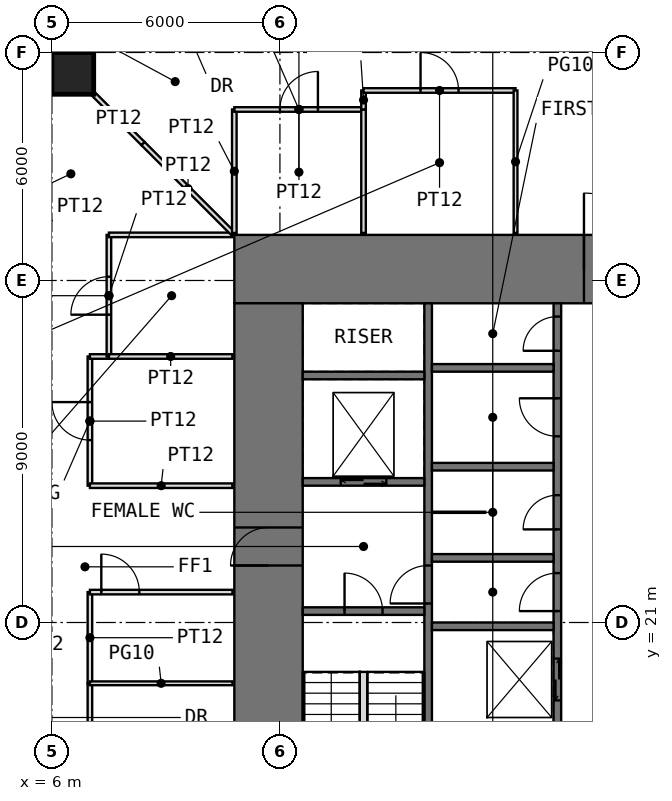
"""IFC4 building model, lengths in metres.
Left out: names, types, materials, properties, quantities, classifications, styles, units other than length and angle.
Written with IfcOpenShell. Run it as: python <this file> out.ifc"""

import sys

from ifc_helpers import new_model, si_unit, direction, frame, frame_2d, origin, origin_2d, place, context, subcontext, project, spatial, rectangle, extrude, element, fill, save


model = new_model("IFC4")
c1 = context("Model", 3, precision=1e-05, world=origin(), true_north=direction((0.0, 1.0)))
c2 = subcontext(c1, "Body", "Model", "MODEL_VIEW")
j1 = project(units=[si_unit("LENGTHUNIT", "METRE"), si_unit("PLANEANGLEUNIT", "RADIAN")], contexts=[c1])
p1 = place(None, origin())
s1 = spatial("IfcSite", under=j1, at=p1, CompositionType="ELEMENT")
p2 = place(p1, origin())
s2 = spatial("IfcBuilding", under=s1, at=p2, CompositionType="ELEMENT")
p3 = place(p2, frame((0.0, 0.0, 30.5)))
s3 = spatial("IfcBuildingStorey", under=s2, at=p3, CompositionType="ELEMENT", Elevation=30.5)
p4 = place(p3, frame((6.55, 35.45, 0.0), z_axis=(0.0, 0.0, 1.0), x_axis=(1.0, 0.0, 0.0)))
e1 = element("IfcColumn", 1, at=p4, inside=s3, PredefinedType="COLUMN", context=c2, shape_type="SweptSolid", body=[
    extrude(rectangle(XDim=1.1, YDim=1.1, at=origin_2d()), origin(), (0.0, 0.0, 1.0), 4.0),
])
p5 = place(p3, frame((10.8, 30.3, -0.05), z_axis=(0.0, 0.0, 1.0), x_axis=(1.0, 0.0, 0.0)))
e2 = element("IfcWall", 2, at=p5, inside=s3, PredefinedType="SHEAR", context=c2, shape_type="SweptSolid", body=[
    extrude(rectangle(XDim=20.4, YDim=1.8, at=frame_2d((10.2, 0.0))), origin(), (0.0, 0.0, 1.0), 4.0),
])
p6 = place(p5, frame((9.2, 0.0, 0.05)))
e3 = element("IfcOpeningElement", 3, at=p6, cuts=e2, PredefinedType="OPENING", context=c2, shape_type="SweptSolid", body=[
    extrude(rectangle(XDim=2.0, YDim=2.2, at=frame_2d((1.0, 1.1))), frame((0.0, 0.91, 0.0), z_axis=(0.0, -1.0, 0.0), x_axis=(1.0, 0.0, 0.0)), (0.0, 0.0, 1.0), 1.82),
])
p7 = place(p3, frame((11.7, 12.6, -0.05), z_axis=(0.0, 0.0, 1.0), x_axis=(0.0, 1.0, 0.0)))
e4 = element("IfcWall", 4, at=p7, inside=s3, PredefinedType="SHEAR", context=c2, shape_type="SweptSolid", body=[
    extrude(rectangle(XDim=16.8, YDim=1.8, at=frame_2d((8.4, 0.0))), origin(), (0.0, 0.0, 1.0), 4.0),
])
p8 = place(p7, frame((9.9, 0.0, 0.05)))
e5 = element("IfcOpeningElement", 5, at=p8, cuts=e4, PredefinedType="OPENING", context=c2, shape_type="SweptSolid", body=[
    extrude(rectangle(XDim=1.0, YDim=2.2, at=frame_2d((0.5, 1.1))), frame((0.0, 0.91, 0.0), z_axis=(0.0, -1.0, 0.0), x_axis=(1.0, 0.0, 0.0)), (0.0, 0.0, 1.0), 1.82),
])
p9 = place(p3, frame((15.9, 12.6, -0.05), z_axis=(0.0, 0.0, 1.0), x_axis=(0.0, 1.0, 0.0)))
e6 = element("IfcWall", 6, at=p9, inside=s3, PredefinedType="SHEAR", context=c2, shape_type="SweptSolid", body=[
    extrude(rectangle(XDim=16.8, YDim=0.2, at=frame_2d((8.4, 0.0))), origin(), (0.0, 0.0, 1.0), 4.0),
])
p10 = place(p9, frame((8.9, 0.0, 0.05)))
e7 = element("IfcOpeningElement", 7, at=p10, cuts=e6, PredefinedType="OPENING", context=c2, shape_type="SweptSolid", body=[
    extrude(rectangle(XDim=1.0, YDim=2.2, at=frame_2d((0.5, 1.1))), frame((0.0, 0.11, 0.0), z_axis=(0.0, -1.0, 0.0), x_axis=(1.0, 0.0, 0.0)), (0.0, 0.0, 1.0), 0.22),
])
p11 = place(p3, frame((19.3, 12.6, -0.05), z_axis=(0.0, 0.0, 1.0), x_axis=(0.0, 1.0, 0.0)))
e8 = element("IfcWall", 8, at=p11, inside=s3, PredefinedType="SHEAR", context=c2, shape_type="SweptSolid", body=[
    extrude(rectangle(XDim=16.8, YDim=0.2, at=frame_2d((8.4, 0.0))), origin(), (0.0, 0.0, 1.0), 4.0),
])
p12 = place(p11, frame((8.7, 0.0, 0.05)))
e9 = element("IfcOpeningElement", 9, at=p12, cuts=e8, PredefinedType="OPENING", context=c2, shape_type="SweptSolid", body=[
    extrude(rectangle(XDim=1.0, YDim=2.2, at=frame_2d((0.5, 1.1))), frame((0.0, 0.11, 0.0), z_axis=(0.0, -1.0, 0.0), x_axis=(1.0, 0.0, 0.0)), (0.0, 0.0, 1.0), 0.22),
])
p13 = place(p11, frame((10.85, 0.0, 0.05)))
e10 = element("IfcOpeningElement", 10, at=p13, cuts=e8, PredefinedType="OPENING", context=c2, shape_type="SweptSolid", body=[
    extrude(rectangle(XDim=0.9, YDim=2.2, at=frame_2d((0.45, 1.1))), frame((0.0, 0.11, 0.0), z_axis=(0.0, -1.0, 0.0), x_axis=(1.0, 0.0, 0.0)), (0.0, 0.0, 1.0), 0.22),
])
p14 = place(p11, frame((13.3, 0.0, 0.05)))
e11 = element("IfcOpeningElement", 11, at=p14, cuts=e8, PredefinedType="OPENING", context=c2, shape_type="SweptSolid", body=[
    extrude(rectangle(XDim=1.0, YDim=2.2, at=frame_2d((0.5, 1.1))), frame((0.0, 0.11, 0.0), z_axis=(0.0, -1.0, 0.0), x_axis=(1.0, 0.0, 0.0)), (0.0, 0.0, 1.0), 0.22),
])
p15 = place(p11, frame((15.55, 0.0, 0.05)))
e12 = element("IfcOpeningElement", 12, at=p15, cuts=e8, PredefinedType="OPENING", context=c2, shape_type="SweptSolid", body=[
    extrude(rectangle(XDim=0.9, YDim=2.2, at=frame_2d((0.45, 1.1))), frame((0.0, 0.11, 0.0), z_axis=(0.0, -1.0, 0.0), x_axis=(1.0, 0.0, 0.0)), (0.0, 0.0, 1.0), 0.22),
])
p16 = place(p11, frame((0.75, 0.0, 0.05)))
e13 = element("IfcOpeningElement", 13, at=p16, cuts=e8, PredefinedType="OPENING", context=c2, shape_type="SweptSolid", body=[
    extrude(rectangle(XDim=1.1, YDim=2.2, at=frame_2d((0.55, 1.1))), frame((0.0, 0.11, 0.0), z_axis=(0.0, -1.0, 0.0), x_axis=(1.0, 0.0, 0.0)), (0.0, 0.0, 1.0), 0.22),
])
p17 = place(p11, frame((3.55, 0.0, 0.05)))
e14 = element("IfcOpeningElement", 14, at=p17, cuts=e8, PredefinedType="OPENING", context=c2, shape_type="SweptSolid", body=[
    extrude(rectangle(XDim=1.1, YDim=2.2, at=frame_2d((0.55, 1.1))), frame((0.0, 0.11, 0.0), z_axis=(0.0, -1.0, 0.0), x_axis=(1.0, 0.0, 0.0)), (0.0, 0.0, 1.0), 0.22),
])
p18 = place(p11, frame((6.35, 0.0, 0.05)))
e15 = element("IfcOpeningElement", 15, at=p18, cuts=e8, PredefinedType="OPENING", context=c2, shape_type="SweptSolid", body=[
    extrude(rectangle(XDim=1.1, YDim=2.2, at=frame_2d((0.55, 1.1))), frame((0.0, 0.11, 0.0), z_axis=(0.0, -1.0, 0.0), x_axis=(1.0, 0.0, 0.0)), (0.0, 0.0, 1.0), 0.22),
])
p19 = place(p3, frame((12.6, 21.3, -0.05), z_axis=(0.0, 0.0, 1.0), x_axis=(1.0, 0.0, 0.0)))
e16 = element("IfcWall", 16, at=p19, inside=s3, PredefinedType="SHEAR", context=c2, shape_type="SweptSolid", body=[
    extrude(rectangle(XDim=3.2, YDim=0.2, at=frame_2d((1.6, 0.0))), origin(), (0.0, 0.0, 1.0), 4.0),
])
p20 = place(p19, frame((1.1, 0.0, 0.05)))
e17 = element("IfcOpeningElement", 17, at=p20, cuts=e16, PredefinedType="OPENING", context=c2, shape_type="SweptSolid", body=[
    extrude(rectangle(XDim=1.0, YDim=2.2, at=frame_2d((0.5, 1.1))), frame((0.0, 0.11, 0.0), z_axis=(0.0, -1.0, 0.0), x_axis=(1.0, 0.0, 0.0)), (0.0, 0.0, 1.0), 0.22),
])
p21 = place(p3, frame((12.6, 24.7, -0.05), z_axis=(0.0, 0.0, 1.0), x_axis=(1.0, 0.0, 0.0)))
e18 = element("IfcWall", 18, at=p21, inside=s3, PredefinedType="SHEAR", context=c2, shape_type="SweptSolid", body=[
    extrude(rectangle(XDim=3.2, YDim=0.2, at=frame_2d((1.6, 0.0))), origin(), (0.0, 0.0, 1.0), 4.0),
])
p22 = place(p21, frame((1.0, 0.0, 0.05)))
e19 = element("IfcOpeningElement", 19, at=p22, cuts=e18, PredefinedType="OPENING", context=c2, shape_type="SweptSolid", body=[
    extrude(rectangle(XDim=1.2, YDim=2.2, at=frame_2d((0.6, 1.1))), frame((0.0, 0.11, 0.0), z_axis=(0.0, -1.0, 0.0), x_axis=(1.0, 0.0, 0.0)), (0.0, 0.0, 1.0), 0.22),
])
for number, where, z_axis, x_axis in (
    (20, (12.6, 27.5, -0.05), (0.0, 0.0, 1.0), (1.0, 0.0, 0.0)),
    (21, (16.0, 20.9, -0.05), (0.0, 0.0, 1.0), (1.0, 0.0, 0.0)),
    (22, (16.0, 22.7, -0.05), (0.0, 0.0, 1.0), (1.0, 0.0, 0.0)),
    (23, (16.0, 25.1, -0.05), (0.0, 0.0, 1.0), (1.0, 0.0, 0.0)),
    (24, (16.0, 27.7, -0.05), (0.0, 0.0, 1.0), (1.0, 0.0, 0.0)),
):
    element("IfcWall", number, at=place(p3, frame(where, z_axis=z_axis, x_axis=x_axis)), inside=s3, PredefinedType="SHEAR", context=c2, shape_type="SweptSolid", body=[
        extrude(rectangle(XDim=3.2, YDim=0.2, at=frame_2d((1.6, 0.0))), origin(), (0.0, 0.0, 1.0), 4.0),
    ])
p23 = place(p3, frame((16.0, 23.9, 0.0), z_axis=(0.0, 0.0, 1.0), x_axis=(1.0, 0.0, 0.0)))
e25 = element("IfcWall", 25, at=p23, inside=s3, PredefinedType="PARTITIONING", context=c2, shape_type="SweptSolid", body=[
    extrude(rectangle(XDim=1.4, YDim=0.03, at=frame_2d((0.7, 0.0))), origin(), (0.0, 0.0, 1.0), 3.75),
])
p24 = place(p3, frame((7.0, 15.8, 0.0), z_axis=(0.0, 0.0, 1.0), x_axis=(0.0, 1.0, 0.0)))
e26 = element("IfcWall", 26, at=p24, inside=s3, PredefinedType="PARTITIONING", context=c2, shape_type="SweptSolid", body=[
    extrude(rectangle(XDim=3.6, YDim=0.12, at=frame_2d((1.8, 0.0))), origin(), (0.0, 0.0, 1.0), 3.75),
])
p25 = place(p24, frame((1.3, 0.0, 0.0)))
e27 = element("IfcOpeningElement", 27, at=p25, cuts=e26, PredefinedType="OPENING", context=c2, shape_type="SweptSolid", body=[
    extrude(rectangle(XDim=1.0, YDim=2.4, at=frame_2d((0.5, 1.2))), frame((0.0, 0.07, 0.0), z_axis=(0.0, -1.0, 0.0), x_axis=(1.0, 0.0, 0.0)), (0.0, 0.0, 1.0), 0.14),
])
p26 = place(p3, frame((7.0, 19.4, 0.0), z_axis=(0.0, 0.0, 1.0), x_axis=(0.0, 1.0, 0.0)))
e28 = element("IfcWall", 28, at=p26, inside=s3, PredefinedType="PARTITIONING", context=c2, shape_type="SweptSolid", body=[
    extrude(rectangle(XDim=2.4, YDim=0.12, at=frame_2d((1.2, 0.0))), origin(), (0.0, 0.0, 1.0), 3.75),
])
p27 = place(p3, frame((7.0, 19.4, 0.0), z_axis=(0.0, 0.0, 1.0), x_axis=(1.0, 0.0, 0.0)))
e29 = element("IfcWall", 29, at=p27, inside=s3, PredefinedType="PARTITIONING", context=c2, shape_type="SweptSolid", body=[
    extrude(rectangle(XDim=3.75, YDim=0.1, at=frame_2d((1.875, 0.0))), origin(), (0.0, 0.0, 1.0), 3.75),
])
p28 = place(p3, frame((7.0, 21.8, 0.0), z_axis=(0.0, 0.0, 1.0), x_axis=(1.0, 0.0, 0.0)))
e30 = element("IfcWall", 30, at=p28, inside=s3, PredefinedType="PARTITIONING", context=c2, shape_type="SweptSolid", body=[
    extrude(rectangle(XDim=3.75, YDim=0.12, at=frame_2d((1.875, 0.0))), origin(), (0.0, 0.0, 1.0), 3.75),
])
p29 = place(p28, frame((0.3, 0.0, 0.0)))
e31 = element("IfcOpeningElement", 31, at=p29, cuts=e30, PredefinedType="OPENING", context=c2, shape_type="SweptSolid", body=[
    extrude(rectangle(XDim=1.0, YDim=2.4, at=frame_2d((0.5, 1.2))), frame((0.0, 0.07, 0.0), z_axis=(0.0, -1.0, 0.0), x_axis=(1.0, 0.0, 0.0)), (0.0, 0.0, 1.0), 0.14),
])
p30 = place(p3, frame((7.0, 24.6, 0.0), z_axis=(0.0, 0.0, 1.0), x_axis=(0.0, 1.0, 0.0)))
e32 = element("IfcWall", 32, at=p30, inside=s3, PredefinedType="PARTITIONING", context=c2, shape_type="SweptSolid", body=[
    extrude(rectangle(XDim=3.4, YDim=0.12, at=frame_2d((1.7, 0.0))), origin(), (0.0, 0.0, 1.0), 3.75),
])
p31 = place(p30, frame((1.2, 0.0, 0.0)))
e33 = element("IfcOpeningElement", 33, at=p31, cuts=e32, PredefinedType="OPENING", context=c2, shape_type="SweptSolid", body=[
    extrude(rectangle(XDim=1.0, YDim=2.4, at=frame_2d((0.5, 1.2))), frame((0.0, 0.07, 0.0), z_axis=(0.0, -1.0, 0.0), x_axis=(1.0, 0.0, 0.0)), (0.0, 0.0, 1.0), 0.14),
])
p32 = place(p3, frame((7.0, 24.6, 0.0), z_axis=(0.0, 0.0, 1.0), x_axis=(1.0, 0.0, 0.0)))
e34 = element("IfcWall", 34, at=p32, inside=s3, PredefinedType="PARTITIONING", context=c2, shape_type="SweptSolid", body=[
    extrude(rectangle(XDim=3.75, YDim=0.12, at=frame_2d((1.875, 0.0))), origin(), (0.0, 0.0, 1.0), 3.75),
])
p33 = place(p3, frame((7.0, 28.0, 0.0), z_axis=(0.0, 0.0, 1.0), x_axis=(1.0, 0.0, 0.0)))
e35 = element("IfcWall", 35, at=p33, inside=s3, PredefinedType="PARTITIONING", context=c2, shape_type="SweptSolid", body=[
    extrude(rectangle(XDim=0.5, YDim=0.12, at=frame_2d((0.25, 0.0))), origin(), (0.0, 0.0, 1.0), 3.75),
])
p34 = place(p3, frame((7.11, 34.89, 0.0), z_axis=(0.0, 0.0, 1.0), x_axis=(0.707106781187, -0.707106781187, 0.0)))
e36 = element("IfcWall", 36, at=p34, inside=s3, PredefinedType="PARTITIONING", context=c2, shape_type="SweptSolid", body=[
    extrude(rectangle(XDim=1.822, YDim=0.12, at=frame_2d((0.911, 0.0))), origin(), (0.0, 0.0, 1.0), 3.75),
])
p35 = place(p3, frame((7.5, 28.0, 0.0), z_axis=(0.0, 0.0, 1.0), x_axis=(0.0, 1.0, 0.0)))
e37 = element("IfcWall", 37, at=p35, inside=s3, PredefinedType="PARTITIONING", context=c2, shape_type="SweptSolid", body=[
    extrude(rectangle(XDim=3.2, YDim=0.12, at=frame_2d((1.6, 0.0))), origin(), (0.0, 0.0, 1.0), 3.75),
])
p36 = place(p35, frame((1.1, 0.0, 0.0)))
e38 = element("IfcOpeningElement", 38, at=p36, cuts=e37, PredefinedType="OPENING", context=c2, shape_type="SweptSolid", body=[
    extrude(rectangle(XDim=1.0, YDim=2.2, at=frame_2d((0.5, 1.1))), frame((0.0, 0.07, 0.0), z_axis=(0.0, -1.0, 0.0), x_axis=(1.0, 0.0, 0.0)), (0.0, 0.0, 1.0), 0.14),
])
for number, where, z_axis, x_axis in (
    (39, (7.5, 28.0, 0.0), (0.0, 0.0, 1.0), (1.0, 0.0, 0.0)),
    (40, (7.5, 31.2, 0.0), (0.0, 0.0, 1.0), (1.0, 0.0, 0.0)),
):
    element("IfcWall", number, at=place(p3, frame(where, z_axis=z_axis, x_axis=x_axis)), inside=s3, PredefinedType="PARTITIONING", context=c2, shape_type="SweptSolid", body=[
        extrude(rectangle(XDim=3.25, YDim=0.12, at=frame_2d((1.625, 0.0))), origin(), (0.0, 0.0, 1.0), 3.75),
    ])
p37 = place(p3, frame((8.398, 33.602, 0.0), z_axis=(0.0, 0.0, 1.0), x_axis=(0.707106781187, -0.707106781187, 0.0)))
e41 = element("IfcWall", 41, at=p37, inside=s3, PredefinedType="PARTITIONING", context=c2, shape_type="SweptSolid", body=[
    extrude(rectangle(XDim=3.346, YDim=0.12, at=frame_2d((1.673, 0.0))), origin(), (0.0, 0.0, 1.0), 3.75),
])
p38 = place(p3, frame((10.8, 31.25, 0.0), z_axis=(0.0, 0.0, 1.0), x_axis=(0.0, 1.0, 0.0)))
e42 = element("IfcWall", 42, at=p38, inside=s3, PredefinedType="PARTITIONING", context=c2, shape_type="SweptSolid", body=[
    extrude(rectangle(XDim=3.25, YDim=0.12, at=frame_2d((1.625, 0.0))), origin(), (0.0, 0.0, 1.0), 3.75),
])
p39 = place(p3, frame((10.8, 34.5, 0.0), z_axis=(0.0, 0.0, 1.0), x_axis=(1.0, 0.0, 0.0)))
e43 = element("IfcWall", 43, at=p39, inside=s3, PredefinedType="PARTITIONING", context=c2, shape_type="SweptSolid", body=[
    extrude(rectangle(XDim=3.4, YDim=0.12, at=frame_2d((1.7, 0.0))), origin(), (0.0, 0.0, 1.0), 3.75),
])
p40 = place(p39, frame((1.2, 0.0, 0.0)))
e44 = element("IfcOpeningElement", 44, at=p40, cuts=e43, PredefinedType="OPENING", context=c2, shape_type="SweptSolid", body=[
    extrude(rectangle(XDim=1.0, YDim=2.2, at=frame_2d((0.5, 1.1))), frame((0.0, 0.07, 0.0), z_axis=(0.0, -1.0, 0.0), x_axis=(1.0, 0.0, 0.0)), (0.0, 0.0, 1.0), 0.14),
])
p41 = place(p3, frame((14.2, 31.25, 0.0), z_axis=(0.0, 0.0, 1.0), x_axis=(0.0, 1.0, 0.0)))
e45 = element("IfcWall", 45, at=p41, inside=s3, PredefinedType="PARTITIONING", context=c2, shape_type="SweptSolid", body=[
    extrude(rectangle(XDim=3.25, YDim=0.12, at=frame_2d((1.625, 0.0))), origin(), (0.0, 0.0, 1.0), 3.75),
])
p42 = place(p3, frame((14.2, 34.5, 0.0), z_axis=(0.0, 0.0, 1.0), x_axis=(0.0, 1.0, 0.0)))
e46 = element("IfcWall", 46, at=p42, inside=s3, PredefinedType="PARTITIONING", context=c2, shape_type="SweptSolid", body=[
    extrude(rectangle(XDim=0.5, YDim=0.12, at=frame_2d((0.25, 0.0))), origin(), (0.0, 0.0, 1.0), 3.75),
])
p43 = place(p3, frame((14.2, 35.0, 0.0), z_axis=(0.0, 0.0, 1.0), x_axis=(1.0, 0.0, 0.0)))
e47 = element("IfcWall", 47, at=p43, inside=s3, PredefinedType="PARTITIONING", context=c2, shape_type="SweptSolid", body=[
    extrude(rectangle(XDim=4.0, YDim=0.12, at=frame_2d((2.0, 0.0))), origin(), (0.0, 0.0, 1.0), 3.75),
])
p44 = place(p43, frame((1.5, 0.0, 0.0)))
e48 = element("IfcOpeningElement", 48, at=p44, cuts=e47, PredefinedType="OPENING", context=c2, shape_type="SweptSolid", body=[
    extrude(rectangle(XDim=1.0, YDim=2.4, at=frame_2d((0.5, 1.2))), frame((0.0, 0.07, 0.0), z_axis=(0.0, -1.0, 0.0), x_axis=(1.0, 0.0, 0.0)), (0.0, 0.0, 1.0), 0.14),
])
p45 = place(p3, frame((18.2, 31.25, 0.0), z_axis=(0.0, 0.0, 1.0), x_axis=(0.0, 1.0, 0.0)))
e49 = element("IfcWall", 49, at=p45, inside=s3, PredefinedType="PARTITIONING", context=c2, shape_type="SweptSolid", body=[
    extrude(rectangle(XDim=3.75, YDim=0.1, at=frame_2d((1.875, 0.0))), origin(), (0.0, 0.0, 1.0), 3.75),
])
p46 = place(p3, frame((14.2, 16.62, 0.0), z_axis=(0.0, 0.0, 1.0), x_axis=(0.0, 1.0, 0.0)))
e50 = element("IfcWall", 50, at=p46, inside=s3, PredefinedType="PARTITIONING", context=c2, shape_type="SweptSolid", body=[
    extrude(rectangle(XDim=3.08, YDim=0.2, at=frame_2d((1.54, 0.0))), origin(), (0.0, 0.0, 1.0), 4.0),
])
p47 = place(p6, origin())
e51 = element("IfcDoor", 51, at=p47, inside=s3, OperationType="DOUBLE_DOOR_SINGLE_SWING", PredefinedType="DOOR", context=c2, shape_type="SweptSolid", body=[
    extrude(rectangle(XDim=2.0, YDim=2.2, at=frame_2d((1.0, 1.1))), frame((0.0, 0.025, 0.0), z_axis=(0.0, -1.0, 0.0), x_axis=(1.0, 0.0, 0.0)), (0.0, 0.0, 1.0), 0.05),
])
fill(e3, e51)
p48 = place(p8, origin())
e52 = element("IfcDoor", 52, at=p48, inside=s3, OperationType="SINGLE_SWING_LEFT", PredefinedType="DOOR", context=c2, shape_type="SweptSolid", body=[
    extrude(rectangle(XDim=1.0, YDim=2.2, at=frame_2d((0.5, 1.1))), frame((0.0, 0.025, 0.0), z_axis=(0.0, -1.0, 0.0), x_axis=(1.0, 0.0, 0.0)), (0.0, 0.0, 1.0), 0.05),
])
fill(e5, e52)
p49 = place(p20, origin())
e53 = element("IfcDoor", 53, at=p49, inside=s3, OperationType="SINGLE_SWING_LEFT", PredefinedType="DOOR", context=c2, shape_type="SweptSolid", body=[
    extrude(rectangle(XDim=1.0, YDim=2.2, at=frame_2d((0.5, 1.1))), frame((0.0, 0.025, 0.0), z_axis=(0.0, -1.0, 0.0), x_axis=(1.0, 0.0, 0.0)), (0.0, 0.0, 1.0), 0.05),
])
fill(e17, e53)
p50 = place(p10, origin())
e54 = element("IfcDoor", 54, at=p50, inside=s3, OperationType="SINGLE_SWING_LEFT", PredefinedType="DOOR", context=c2, shape_type="SweptSolid", body=[
    extrude(rectangle(XDim=1.0, YDim=2.2, at=frame_2d((0.5, 1.1))), frame((0.0, 0.025, 0.0), z_axis=(0.0, -1.0, 0.0), x_axis=(1.0, 0.0, 0.0)), (0.0, 0.0, 1.0), 0.05),
])
fill(e7, e54)
p51 = place(p12, origin())
e55 = element("IfcDoor", 55, at=p51, inside=s3, OperationType="SINGLE_SWING_LEFT", PredefinedType="DOOR", context=c2, shape_type="SweptSolid", body=[
    extrude(rectangle(XDim=1.0, YDim=2.2, at=frame_2d((0.5, 1.1))), frame((0.0, 0.025, 0.0), z_axis=(0.0, -1.0, 0.0), x_axis=(1.0, 0.0, 0.0)), (0.0, 0.0, 1.0), 0.05),
])
fill(e9, e55)
p52 = place(p13, origin())
e56 = element("IfcDoor", 56, at=p52, inside=s3, OperationType="SINGLE_SWING_LEFT", PredefinedType="DOOR", context=c2, shape_type="SweptSolid", body=[
    extrude(rectangle(XDim=0.9, YDim=2.2, at=frame_2d((0.45, 1.1))), frame((0.0, 0.025, 0.0), z_axis=(0.0, -1.0, 0.0), x_axis=(1.0, 0.0, 0.0)), (0.0, 0.0, 1.0), 0.05),
])
fill(e10, e56)
p53 = place(p14, origin())
e57 = element("IfcDoor", 57, at=p53, inside=s3, OperationType="SINGLE_SWING_RIGHT", PredefinedType="DOOR", context=c2, shape_type="SweptSolid", body=[
    extrude(rectangle(XDim=1.0, YDim=2.2, at=frame_2d((0.5, 1.1))), frame((0.0, 0.025, 0.0), z_axis=(0.0, -1.0, 0.0), x_axis=(1.0, 0.0, 0.0)), (0.0, 0.0, 1.0), 0.05),
])
fill(e11, e57)
p54 = place(p15, origin())
e58 = element("IfcDoor", 58, at=p54, inside=s3, OperationType="SINGLE_SWING_LEFT", PredefinedType="DOOR", context=c2, shape_type="SweptSolid", body=[
    extrude(rectangle(XDim=0.9, YDim=2.2, at=frame_2d((0.45, 1.1))), frame((0.0, 0.025, 0.0), z_axis=(0.0, -1.0, 0.0), x_axis=(1.0, 0.0, 0.0)), (0.0, 0.0, 1.0), 0.05),
])
fill(e12, e58)
p55 = place(p40, origin())
e59 = element("IfcDoor", 59, at=p55, inside=s3, OperationType="SINGLE_SWING_RIGHT", PredefinedType="DOOR", context=c2, shape_type="SweptSolid", body=[
    extrude(rectangle(XDim=1.0, YDim=2.2, at=frame_2d((0.5, 1.1))), frame((0.0, 0.025, 0.0), z_axis=(0.0, -1.0, 0.0), x_axis=(1.0, 0.0, 0.0)), (0.0, 0.0, 1.0), 0.05),
])
fill(e44, e59)
p56 = place(p44, origin())
e60 = element("IfcDoor", 60, at=p56, inside=s3, OperationType="SINGLE_SWING_LEFT", PredefinedType="DOOR", context=c2, shape_type="SweptSolid", body=[
    extrude(rectangle(XDim=1.0, YDim=2.4, at=frame_2d((0.5, 1.2))), frame((0.0, 0.025, 0.0), z_axis=(0.0, -1.0, 0.0), x_axis=(1.0, 0.0, 0.0)), (0.0, 0.0, 1.0), 0.05),
])
fill(e48, e60)
p57 = place(p31, origin())
e61 = element("IfcDoor", 61, at=p57, inside=s3, OperationType="SINGLE_SWING_RIGHT", PredefinedType="DOOR", context=c2, shape_type="SweptSolid", body=[
    extrude(rectangle(XDim=1.0, YDim=2.4, at=frame_2d((0.5, 1.2))), frame((0.0, 0.025, 0.0), z_axis=(0.0, -1.0, 0.0), x_axis=(1.0, 0.0, 0.0)), (0.0, 0.0, 1.0), 0.05),
])
fill(e33, e61)
p58 = place(p36, origin())
e62 = element("IfcDoor", 62, at=p58, inside=s3, OperationType="SINGLE_SWING_LEFT", PredefinedType="DOOR", context=c2, shape_type="SweptSolid", body=[
    extrude(rectangle(XDim=1.0, YDim=2.2, at=frame_2d((0.5, 1.1))), frame((0.0, 0.025, 0.0), z_axis=(0.0, -1.0, 0.0), x_axis=(1.0, 0.0, 0.0)), (0.0, 0.0, 1.0), 0.05),
])
fill(e38, e62)
p59 = place(p29, origin())
e63 = element("IfcDoor", 63, at=p59, inside=s3, OperationType="SINGLE_SWING_LEFT", PredefinedType="DOOR", context=c2, shape_type="SweptSolid", body=[
    extrude(rectangle(XDim=1.0, YDim=2.4, at=frame_2d((0.5, 1.2))), frame((0.0, 0.025, 0.0), z_axis=(0.0, -1.0, 0.0), x_axis=(1.0, 0.0, 0.0)), (0.0, 0.0, 1.0), 0.05),
])
fill(e31, e63)
p60 = place(p18, origin())
e64 = element("IfcDoor", 64, at=p60, inside=s3, OperationType="DOUBLE_DOOR_SLIDING", PredefinedType="DOOR", context=c2, shape_type="SweptSolid", body=[
    extrude(rectangle(XDim=1.1, YDim=2.2, at=frame_2d((0.55, 1.1))), frame((0.0, 0.025, 0.0), z_axis=(0.0, -1.0, 0.0), x_axis=(1.0, 0.0, 0.0)), (0.0, 0.0, 1.0), 0.05),
])
fill(e15, e64)
p61 = place(p22, origin())
e65 = element("IfcDoor", 65, at=p61, inside=s3, OperationType="DOUBLE_DOOR_SLIDING", PredefinedType="DOOR", context=c2, shape_type="SweptSolid", body=[
    extrude(rectangle(XDim=1.2, YDim=2.2, at=frame_2d((0.6, 1.1))), frame((0.0, 0.025, 0.0), z_axis=(0.0, -1.0, 0.0), x_axis=(1.0, 0.0, 0.0)), (0.0, 0.0, 1.0), 0.05),
])
fill(e19, e65)
save(model, sys.argv[1])
